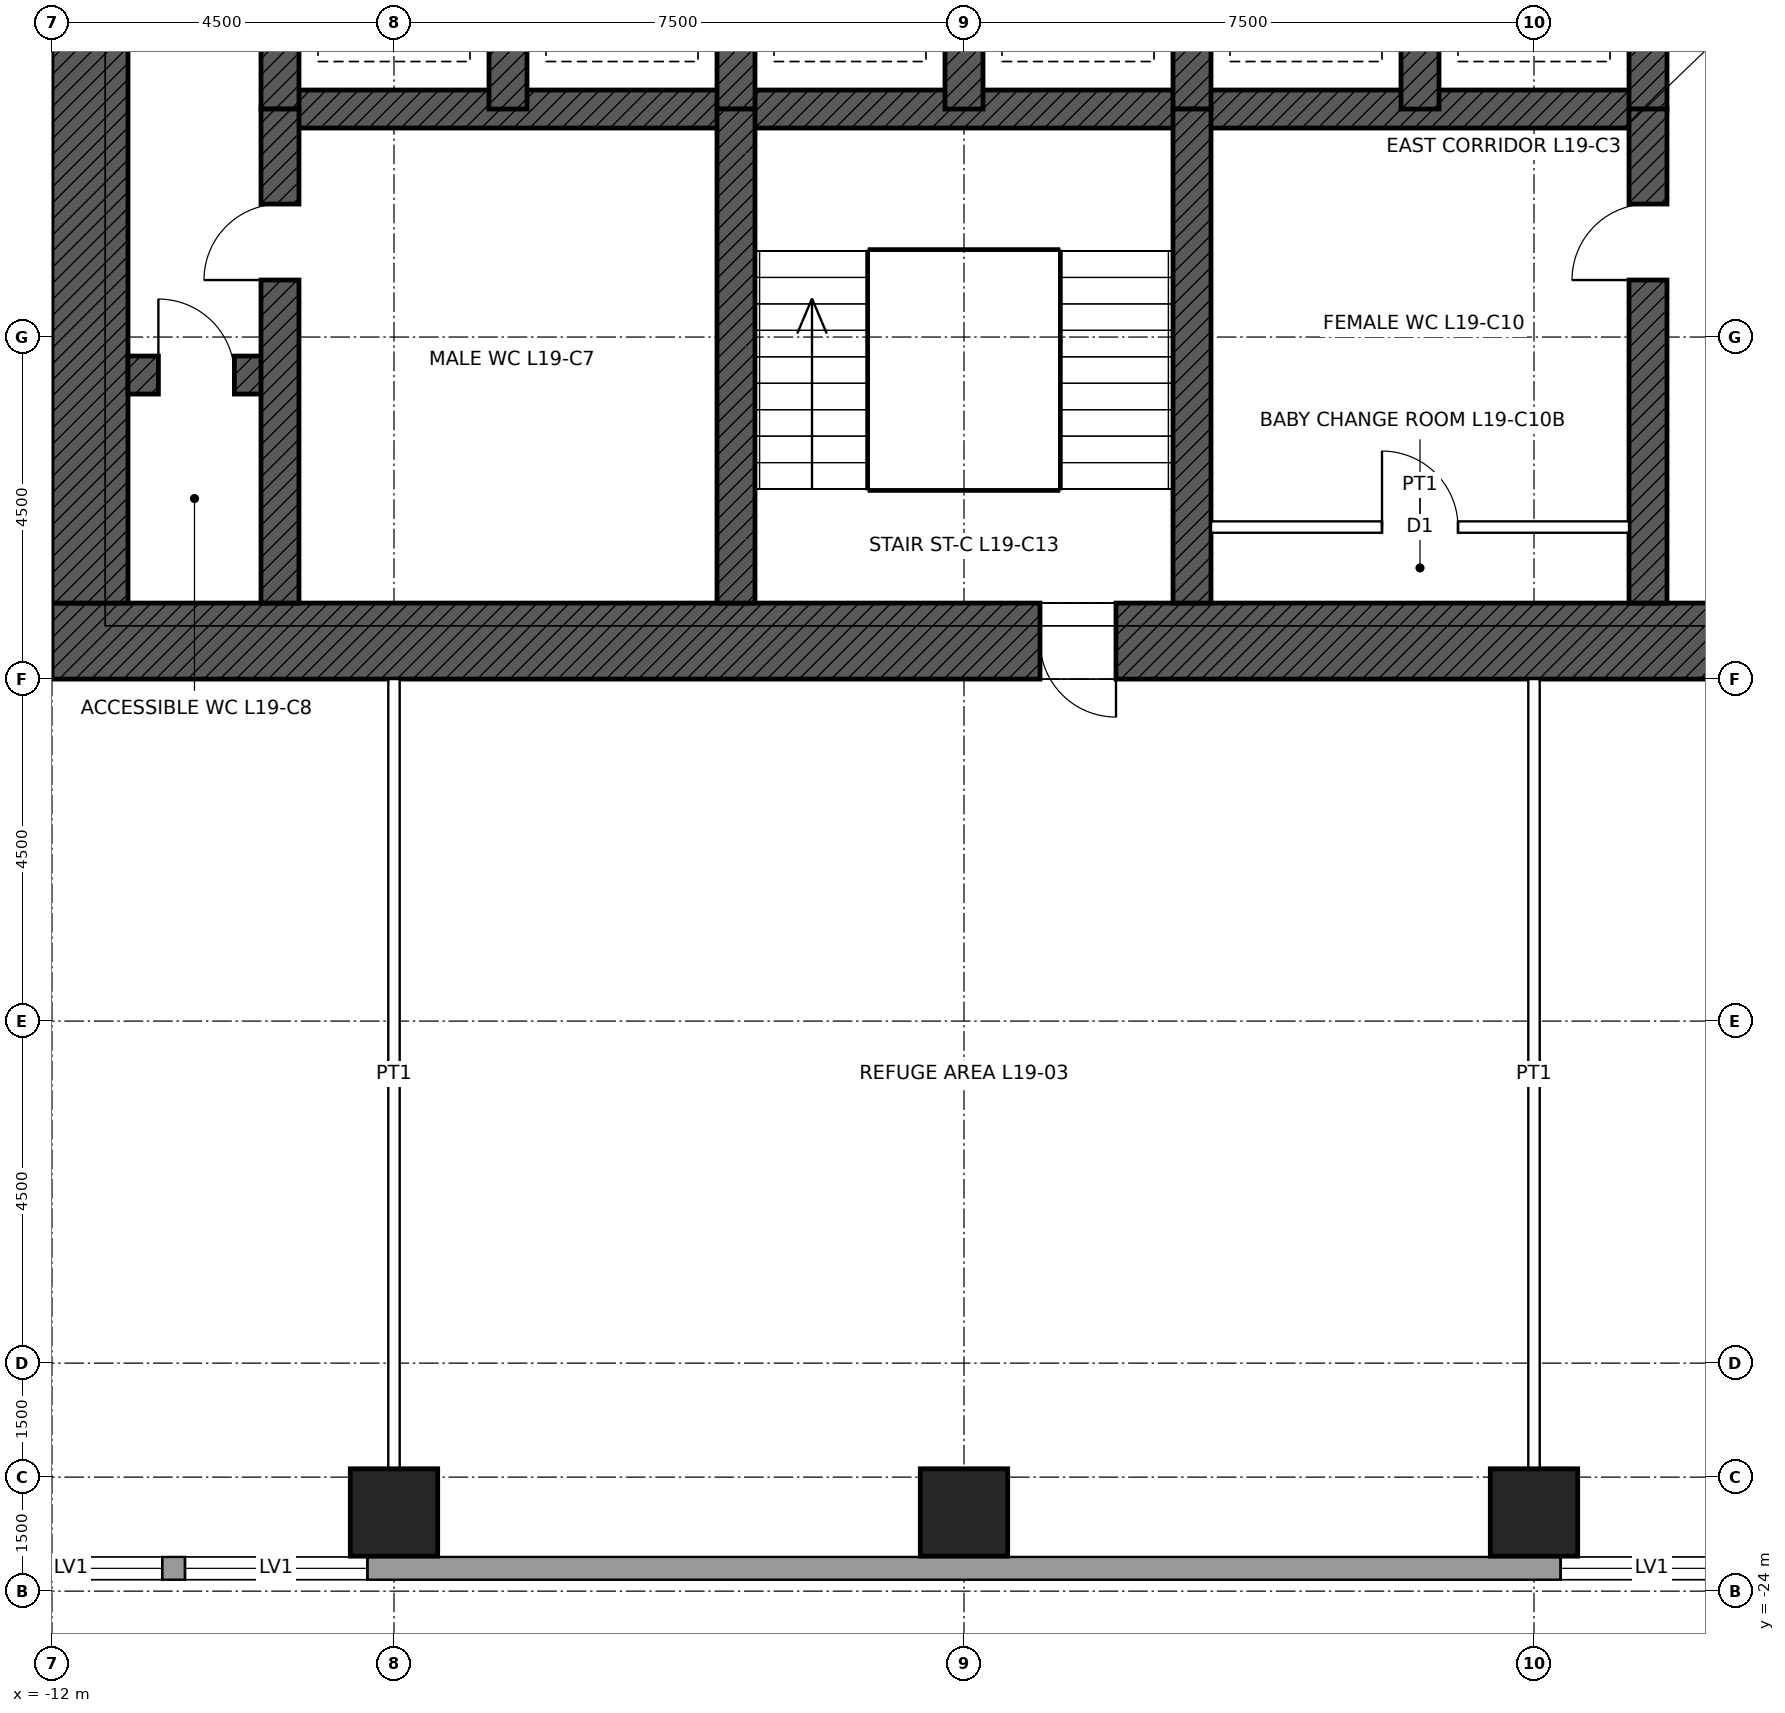
"""IFC4 building model, lengths in metres.
Left out: names, types, materials, properties, quantities, classifications, styles, units other than length and angle.
Written with IfcOpenShell. Run it as: python <this file> out.ifc"""

import sys

from ifc_helpers import new_model, si_unit, direction, frame, frame_2d, origin, origin_2d, place, context, subcontext, project, spatial, rectangle, hollow_rectangle, extrude, element, fill, save


model = new_model("IFC4")
c1 = context("Model", 3, precision=1e-05, world=origin(), true_north=direction((0.0, 1.0)))
c2 = subcontext(c1, "Body", "Model", "MODEL_VIEW")
j1 = project(units=[si_unit("LENGTHUNIT", "METRE"), si_unit("PLANEANGLEUNIT", "RADIAN")], contexts=[c1])
p1 = place(None, origin())
s1 = spatial("IfcSite", under=j1, at=p1, CompositionType="ELEMENT")
p2 = place(p1, origin())
s2 = spatial("IfcBuilding", under=s1, at=p2, CompositionType="ELEMENT")
p3 = place(p2, frame((0.0, 0.0, 98.4)))
s3 = spatial("IfcBuildingStorey", under=s2, at=p3, CompositionType="ELEMENT", Elevation=98.4)
p4 = place(p3, frame((12.0, -11.5, 0.0), z_axis=(0.0, 0.0, 1.0), x_axis=(-1.0, 0.0, 0.0)))
e1 = element("IfcWall", 1, at=p4, inside=s3, PredefinedType="SHEAR", context=c2, shape_type="SweptSolid", body=[
    extrude(rectangle(XDim=24.0, YDim=1.0, at=frame_2d((12.0, 0.0))), origin(), (0.0, 0.0, 1.0), 6.0),
])
p5 = place(p4, frame((10.0, 0.0, 0.0)))
e2 = element("IfcOpeningElement", 2, at=p5, cuts=e1, PredefinedType="OPENING", context=c2, shape_type="SweptSolid", body=[
    extrude(rectangle(XDim=1.0, YDim=2.1, at=frame_2d((0.5, 1.05))), frame((0.0, 0.51, 0.0), z_axis=(0.0, -1.0, 0.0), x_axis=(1.0, 0.0, 0.0)), (0.0, 0.0, 1.0), 1.02),
])
p6 = place(p4, frame((1.0, 0.0, 0.0)))
e3 = element("IfcOpeningElement", 3, at=p6, cuts=e1, PredefinedType="OPENING", context=c2, shape_type="SweptSolid", body=[
    extrude(rectangle(XDim=1.0, YDim=2.4, at=frame_2d((0.5, 1.2))), frame((0.0, 0.51, 0.0), z_axis=(0.0, -1.0, 0.0), x_axis=(1.0, 0.0, 0.0)), (0.0, 0.0, 1.0), 1.02),
])
p7 = place(p3, frame((-11.5, -11.0, 0.0), z_axis=(0.0, 0.0, 1.0), x_axis=(0.0, 1.0, 0.0)))
e4 = element("IfcWall", 4, at=p7, inside=s3, PredefinedType="SHEAR", context=c2, shape_type="SweptSolid", body=[
    extrude(rectangle(XDim=22.0, YDim=1.0, at=frame_2d((11.0, 0.0))), origin(), (0.0, 0.0, 1.0), 6.0),
])
p8 = place(p7, frame((12.0, 0.0, 0.0)))
e5 = element("IfcOpeningElement", 5, at=p8, cuts=e4, PredefinedType="OPENING", context=c2, shape_type="SweptSolid", body=[
    extrude(rectangle(XDim=1.0, YDim=2.4, at=frame_2d((0.5, 1.2))), frame((0.0, 0.51, 0.0), z_axis=(0.0, -1.0, 0.0), x_axis=(1.0, 0.0, 0.0)), (0.0, 0.0, 1.0), 1.02),
])
p9 = place(p3, frame((-9.0, -4.5, 0.0), z_axis=(0.0, 0.0, 1.0), x_axis=(1.0, 0.0, 0.0)))
e6 = element("IfcWall", 6, at=p9, inside=s3, PredefinedType="SHEAR", context=c2, shape_type="SweptSolid", body=[
    extrude(rectangle(XDim=18.0, YDim=0.5, at=frame_2d((9.0, 0.0))), origin(), (0.0, 0.0, 1.0), 6.0),
])
p10 = place(p3, frame((-11.0, -8.0, 0.0), z_axis=(0.0, 0.0, 1.0), x_axis=(1.0, 0.0, 0.0)))
e7 = element("IfcWall", 7, at=p10, inside=s3, PredefinedType="SHEAR", context=c2, shape_type="SweptSolid", body=[
    extrude(rectangle(XDim=2.0, YDim=0.5, at=frame_2d((1.0, 0.0))), origin(), (0.0, 0.0, 1.0), 6.0),
])
p11 = place(p10, frame((0.4, 0.0, 0.0)))
e8 = element("IfcOpeningElement", 8, at=p11, cuts=e7, PredefinedType="OPENING", context=c2, shape_type="SweptSolid", body=[
    extrude(rectangle(XDim=1.0, YDim=2.1, at=frame_2d((0.5, 1.05))), frame((0.0, 0.26, 0.0), z_axis=(0.0, -1.0, 0.0), x_axis=(1.0, 0.0, 0.0)), (0.0, 0.0, 1.0), 0.52),
])
for number, where, z_axis, x_axis in (
    (9, (-9.0, -4.5, 0.0), (0.0, 0.0, 1.0), (0.0, 1.0, 0.0)),
    (10, (9.0, -4.5, 0.0), (0.0, 0.0, 1.0), (0.0, 1.0, 0.0)),
    (11, (-6.0, -4.5, 0.0), (0.0, 0.0, 1.0), (0.0, 1.0, 0.0)),
    (12, (-3.0, -4.5, 0.0), (0.0, 0.0, 1.0), (0.0, 1.0, 0.0)),
    (13, (0.0, -4.5, 0.0), (0.0, 0.0, 1.0), (0.0, 1.0, 0.0)),
    (14, (3.0, -4.5, 0.0), (0.0, 0.0, 1.0), (0.0, 1.0, 0.0)),
    (15, (6.0, -4.5, 0.0), (0.0, 0.0, 1.0), (0.0, 1.0, 0.0)),
):
    element("IfcWall", number, at=place(p3, frame(where, z_axis=z_axis, x_axis=x_axis)), inside=s3, PredefinedType="SHEAR", context=c2, shape_type="SweptSolid", body=[
        extrude(rectangle(XDim=3.0, YDim=0.5, at=frame_2d((1.5, 0.0))), origin(), (0.0, 0.0, 1.0), 6.0),
    ])
p12 = place(p3, frame((-9.0, -11.0, 0.0), z_axis=(0.0, 0.0, 1.0), x_axis=(0.0, 1.0, 0.0)))
e16 = element("IfcWall", 16, at=p12, inside=s3, PredefinedType="SHEAR", context=c2, shape_type="SweptSolid", body=[
    extrude(rectangle(XDim=6.5, YDim=0.5, at=frame_2d((3.25, 0.0))), origin(), (0.0, 0.0, 1.0), 6.0),
])
p13 = place(p12, frame((4.25, 0.0, 0.0)))
e17 = element("IfcOpeningElement", 17, at=p13, cuts=e16, PredefinedType="OPENING", context=c2, shape_type="SweptSolid", body=[
    extrude(rectangle(XDim=1.0, YDim=2.1, at=frame_2d((0.5, 1.05))), frame((0.0, 0.26, 0.0), z_axis=(0.0, -1.0, 0.0), x_axis=(1.0, 0.0, 0.0)), (0.0, 0.0, 1.0), 0.52),
])
p14 = place(p3, frame((9.0, -11.0, 0.0), z_axis=(0.0, 0.0, 1.0), x_axis=(0.0, 1.0, 0.0)))
e18 = element("IfcWall", 18, at=p14, inside=s3, PredefinedType="SHEAR", context=c2, shape_type="SweptSolid", body=[
    extrude(rectangle(XDim=6.5, YDim=0.5, at=frame_2d((3.25, 0.0))), origin(), (0.0, 0.0, 1.0), 6.0),
])
p15 = place(p14, frame((4.25, 0.0, 0.0)))
e19 = element("IfcOpeningElement", 19, at=p15, cuts=e18, PredefinedType="OPENING", context=c2, shape_type="SweptSolid", body=[
    extrude(rectangle(XDim=1.0, YDim=2.1, at=frame_2d((0.5, 1.05))), frame((0.0, 0.26, 0.0), z_axis=(0.0, -1.0, 0.0), x_axis=(1.0, 0.0, 0.0)), (0.0, 0.0, 1.0), 0.52),
])
for number, where, z_axis, x_axis in (
    (20, (-3.0, -11.0, 0.0), (0.0, 0.0, 1.0), (0.0, 1.0, 0.0)),
    (21, (3.0, -11.0, 0.0), (0.0, 0.0, 1.0), (0.0, 1.0, 0.0)),
):
    element("IfcWall", number, at=place(p3, frame(where, z_axis=z_axis, x_axis=x_axis)), inside=s3, PredefinedType="SHEAR", context=c2, shape_type="SweptSolid", body=[
        extrude(rectangle(XDim=6.5, YDim=0.5, at=frame_2d((3.25, 0.0))), origin(), (0.0, 0.0, 1.0), 6.0),
    ])
for number, where, z_axis, x_axis in (
    (22, (7.5, -22.965, -0.25), (0.0, 0.0, 1.0), (1.0, 0.0, 0.0)),
    (23, (0.0, -22.965, -0.25), (0.0, 0.0, 1.0), (1.0, 0.0, 0.0)),
    (24, (-7.5, -22.965, -0.25), (0.0, 0.0, 1.0), (1.0, 0.0, 0.0)),
):
    element("IfcColumn", number, at=place(p3, frame(where, z_axis=z_axis, x_axis=x_axis)), inside=s3, PredefinedType="COLUMN", context=c2, shape_type="SweptSolid", body=[
        extrude(hollow_rectangle(XDim=1.15, YDim=1.15, WallThickness=0.075, at=origin_2d()), origin(), (0.0, 0.0, 1.0), 6.25),
    ])
p16 = place(p3, frame((16.2, -23.7, 0.0), z_axis=(0.0, 0.0, 1.0), x_axis=(-1.0, 0.0, 0.0)))
e25 = element("IfcWall", 25, at=p16, inside=s3, PredefinedType="SOLIDWALL", context=c2, shape_type="SweptSolid", body=[
    extrude(rectangle(XDim=32.4, YDim=0.3, at=frame_2d((16.2, 0.0))), origin(), (0.0, 0.0, 1.0), 5.8),
])
p17 = place(p16, frame((3.25, 0.0, 1.5)))
e26 = element("IfcOpeningElement", 26, at=p17, cuts=e25, PredefinedType="OPENING", context=c2, shape_type="SweptSolid", body=[
    extrude(rectangle(XDim=2.4, YDim=2.4, at=frame_2d((1.2, 1.2))), frame((0.0, 0.16, 0.0), z_axis=(0.0, -1.0, 0.0), x_axis=(1.0, 0.0, 0.0)), (0.0, 0.0, 1.0), 0.32),
])
p18 = place(p16, frame((5.95, 0.0, 1.5)))
e27 = element("IfcOpeningElement", 27, at=p18, cuts=e25, PredefinedType="OPENING", context=c2, shape_type="SweptSolid", body=[
    extrude(rectangle(XDim=2.4, YDim=2.4, at=frame_2d((1.2, 1.2))), frame((0.0, 0.16, 0.0), z_axis=(0.0, -1.0, 0.0), x_axis=(1.0, 0.0, 0.0)), (0.0, 0.0, 1.0), 0.32),
])
p19 = place(p16, frame((24.05, 0.0, 1.5)))
e28 = element("IfcOpeningElement", 28, at=p19, cuts=e25, PredefinedType="OPENING", context=c2, shape_type="SweptSolid", body=[
    extrude(rectangle(XDim=2.4, YDim=2.4, at=frame_2d((1.2, 1.2))), frame((0.0, 0.16, 0.0), z_axis=(0.0, -1.0, 0.0), x_axis=(1.0, 0.0, 0.0)), (0.0, 0.0, 1.0), 0.32),
])
p20 = place(p16, frame((26.75, 0.0, 1.5)))
e29 = element("IfcOpeningElement", 29, at=p20, cuts=e25, PredefinedType="OPENING", context=c2, shape_type="SweptSolid", body=[
    extrude(rectangle(XDim=2.4, YDim=2.4, at=frame_2d((1.2, 1.2))), frame((0.0, 0.16, 0.0), z_axis=(0.0, -1.0, 0.0), x_axis=(1.0, 0.0, 0.0)), (0.0, 0.0, 1.0), 0.32),
])
for number, where, z_axis, x_axis in (
    (30, (-7.5, -12.0, 0.0), (0.0, 0.0, 1.0), (0.0, -1.0, 0.0)),
    (31, (7.5, -12.0, 0.0), (0.0, 0.0, 1.0), (0.0, -1.0, 0.0)),
):
    element("IfcWall", number, at=place(p3, frame(where, z_axis=z_axis, x_axis=x_axis)), inside=s3, PredefinedType="PARTITIONING", context=c2, shape_type="SweptSolid", body=[
        extrude(rectangle(XDim=10.39, YDim=0.15, at=frame_2d((5.195, 0.0))), origin(), (0.0, 0.0, 1.0), 5.8),
    ])
p21 = place(p3, frame((3.25, -10.0, 0.0), z_axis=(0.0, 0.0, 1.0), x_axis=(1.0, 0.0, 0.0)))
e32 = element("IfcWall", 32, at=p21, inside=s3, PredefinedType="PARTITIONING", context=c2, shape_type="SweptSolid", body=[
    extrude(rectangle(XDim=5.5, YDim=0.15, at=frame_2d((2.75, 0.0))), origin(), (0.0, 0.0, 1.0), 5.75),
])
p22 = place(p21, frame((2.25, 0.0, 0.0)))
e33 = element("IfcOpeningElement", 33, at=p22, cuts=e32, PredefinedType="OPENING", context=c2, shape_type="SweptSolid", body=[
    extrude(rectangle(XDim=1.0, YDim=2.1, at=frame_2d((0.5, 1.05))), frame((0.0, 0.085, 0.0), z_axis=(0.0, -1.0, 0.0), x_axis=(1.0, 0.0, 0.0)), (0.0, 0.0, 1.0), 0.17),
])
p23 = place(p18, origin())
e34 = element("IfcWindow", 34, at=p23, inside=s3, PartitioningType="SINGLE_PANEL", PredefinedType="WINDOW", context=c2, shape_type="SweptSolid", body=[
    extrude(rectangle(XDim=2.4, YDim=2.4, at=frame_2d((1.2, 1.2))), frame((0.0, 0.15, 0.0), z_axis=(0.0, -1.0, 0.0), x_axis=(1.0, 0.0, 0.0)), (0.0, 0.0, 1.0), 0.06),
])
fill(e27, e34)
p24 = place(p19, origin())
e35 = element("IfcWindow", 35, at=p24, inside=s3, PartitioningType="SINGLE_PANEL", PredefinedType="WINDOW", context=c2, shape_type="SweptSolid", body=[
    extrude(rectangle(XDim=2.4, YDim=2.4, at=frame_2d((1.2, 1.2))), frame((0.0, 0.15, 0.0), z_axis=(0.0, -1.0, 0.0), x_axis=(1.0, 0.0, 0.0)), (0.0, 0.0, 1.0), 0.06),
])
fill(e28, e35)
p25 = place(p20, origin())
e36 = element("IfcWindow", 36, at=p25, inside=s3, PartitioningType="SINGLE_PANEL", PredefinedType="WINDOW", context=c2, shape_type="SweptSolid", body=[
    extrude(rectangle(XDim=2.4, YDim=2.4, at=frame_2d((1.2, 1.2))), frame((0.0, 0.15, 0.0), z_axis=(0.0, -1.0, 0.0), x_axis=(1.0, 0.0, 0.0)), (0.0, 0.0, 1.0), 0.06),
])
fill(e29, e36)
p26 = place(p5, origin())
e37 = element("IfcDoor", 37, at=p26, inside=s3, OperationType="SINGLE_SWING_LEFT", PredefinedType="DOOR", context=c2, shape_type="SweptSolid", body=[
    extrude(rectangle(XDim=1.0, YDim=2.1, at=frame_2d((0.5, 1.05))), frame((0.0, 0.485, 0.0), z_axis=(0.0, -1.0, 0.0), x_axis=(1.0, 0.0, 0.0)), (0.0, 0.0, 1.0), 0.05),
])
fill(e2, e37)
p27 = place(p13, origin())
e38 = element("IfcDoor", 38, at=p27, inside=s3, OperationType="SINGLE_SWING_LEFT", PredefinedType="DOOR", context=c2, shape_type="SweptSolid", body=[
    extrude(rectangle(XDim=1.0, YDim=2.1, at=frame_2d((0.5, 1.05))), frame((0.0, 0.025, 0.0), z_axis=(0.0, -1.0, 0.0), x_axis=(1.0, 0.0, 0.0)), (0.0, 0.0, 1.0), 0.05),
])
fill(e17, e38)
p28 = place(p15, origin())
e39 = element("IfcDoor", 39, at=p28, inside=s3, OperationType="SINGLE_SWING_LEFT", PredefinedType="DOOR", context=c2, shape_type="SweptSolid", body=[
    extrude(rectangle(XDim=1.0, YDim=2.1, at=frame_2d((0.5, 1.05))), frame((0.0, 0.025, 0.0), z_axis=(0.0, -1.0, 0.0), x_axis=(1.0, 0.0, 0.0)), (0.0, 0.0, 1.0), 0.05),
])
fill(e19, e39)
p29 = place(p11, origin())
e40 = element("IfcDoor", 40, at=p29, inside=s3, OperationType="SINGLE_SWING_LEFT", PredefinedType="DOOR", context=c2, shape_type="SweptSolid", body=[
    extrude(rectangle(XDim=1.0, YDim=2.1, at=frame_2d((0.5, 1.05))), frame((0.0, 0.025, 0.0), z_axis=(0.0, -1.0, 0.0), x_axis=(1.0, 0.0, 0.0)), (0.0, 0.0, 1.0), 0.05),
])
fill(e8, e40)
p30 = place(p22, origin())
e41 = element("IfcDoor", 41, at=p30, inside=s3, OperationType="SINGLE_SWING_LEFT", PredefinedType="DOOR", context=c2, shape_type="SweptSolid", body=[
    extrude(rectangle(XDim=1.0, YDim=2.1, at=frame_2d((0.5, 1.05))), frame((0.0, 0.025, 0.0), z_axis=(0.0, -1.0, 0.0), x_axis=(1.0, 0.0, 0.0)), (0.0, 0.0, 1.0), 0.05),
])
fill(e33, e41)
save(model, sys.argv[1])
